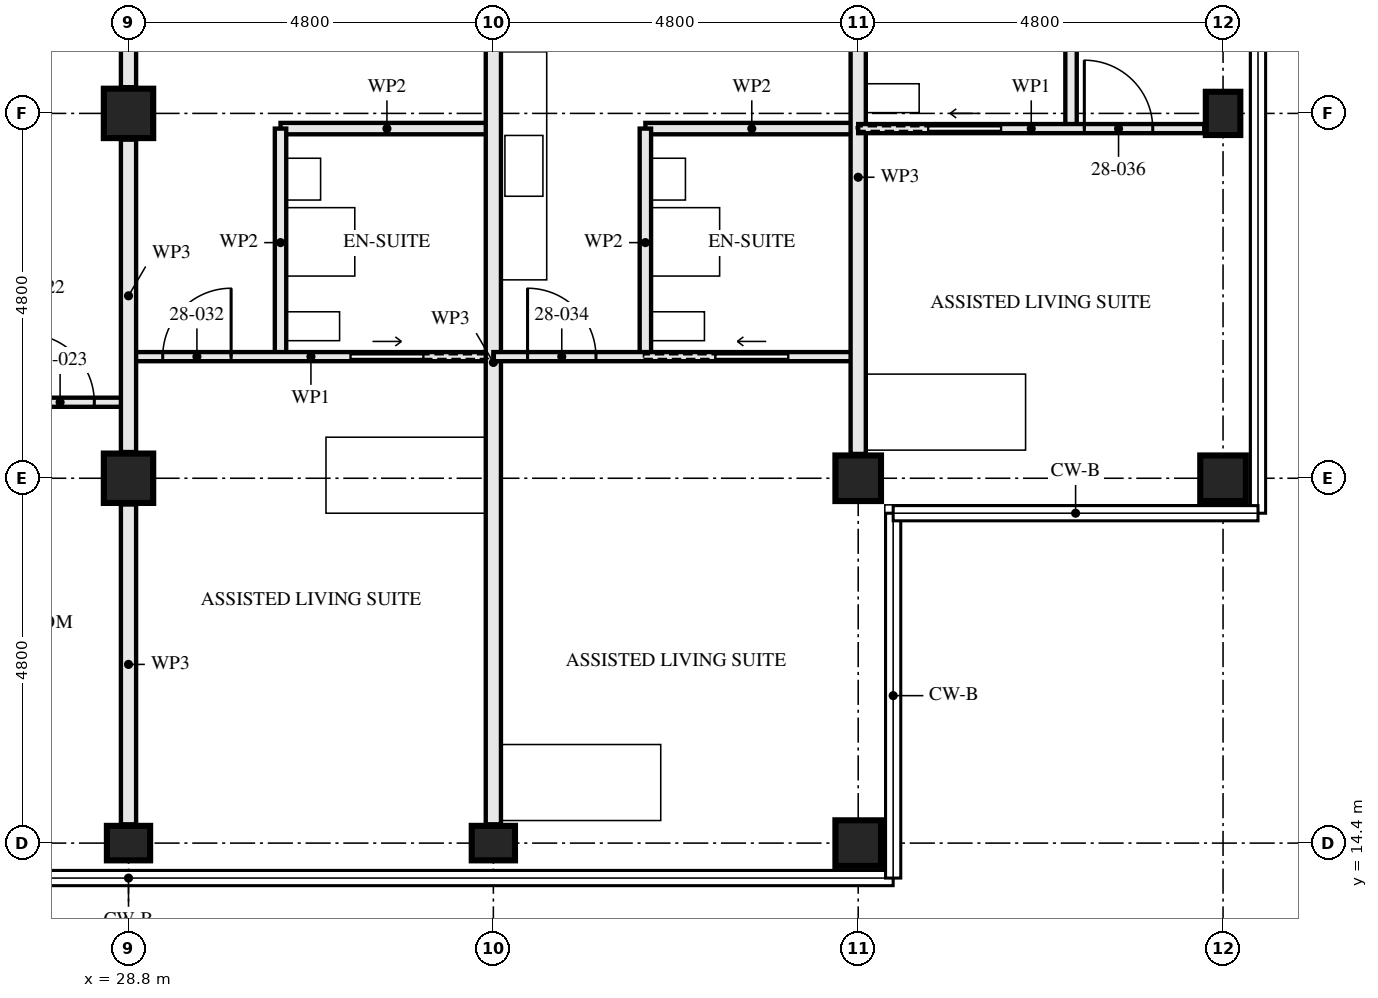
"""IFC4 building model, lengths in metres.
Left out: names, types, materials, properties, quantities, classifications, styles, units other than length and angle.
Written with IfcOpenShell. Run it as: python <this file> out.ifc"""

import sys

from ifc_helpers import new_model, si_unit, direction, frame, frame_2d, origin, origin_2d, place, context, subcontext, project, spatial, rectangle, hollow_rectangle, i_section, extrude, element, fill, save


model = new_model("IFC4")
c1 = context("Model", 3, precision=1e-05, world=origin(), true_north=direction((0.0, 1.0)))
c2 = subcontext(c1, "Body", "Model", "MODEL_VIEW")
j1 = project(units=[si_unit("LENGTHUNIT", "METRE"), si_unit("PLANEANGLEUNIT", "RADIAN")], contexts=[c1])
p1 = place(None, origin())
s1 = spatial("IfcSite", under=j1, at=p1, CompositionType="ELEMENT")
p2 = place(p1, origin())
s2 = spatial("IfcBuilding", under=s1, at=p2, CompositionType="ELEMENT")
p3 = place(p2, frame((0.0, 0.0, 105.0)))
s3 = spatial("IfcBuildingStorey", under=s2, at=p3, CompositionType="ELEMENT", Elevation=105.0)
p4 = place(p3, frame((28.8, 14.4, 0.0), z_axis=(0.0, 0.0, 1.0), x_axis=(0.0, 1.0, 0.0)))
e1 = element("IfcColumn", 1, at=p4, inside=s3, PredefinedType="COLUMN", context=c2, shape_type="SweptSolid", body=[
    extrude(i_section(OverallWidth=0.454, OverallDepth=0.569, WebThickness=0.078, FlangeThickness=0.125, FilletRadius=0.015, at=origin_2d()), origin(), (0.0, 0.0, 1.0), 3.5),
])
for number, where, z_axis, x_axis in (
    (2, (28.8, 19.2, 0.0), (0.0, 0.0, 1.0), (1.0, 0.0, 0.0)),
    (3, (28.8, 24.0, 0.0), (0.0, 0.0, 1.0), (1.0, 0.0, 0.0)),
):
    element("IfcColumn", number, at=place(p3, frame(where, z_axis=z_axis, x_axis=x_axis)), inside=s3, PredefinedType="COLUMN", context=c2, shape_type="SweptSolid", body=[
        extrude(hollow_rectangle(XDim=0.65, YDim=0.65, WallThickness=0.05, at=origin_2d()), origin(), (0.0, 0.0, 1.0), 3.5),
    ])
p5 = place(p3, frame((33.6, 14.4, 0.0), z_axis=(0.0, 0.0, 1.0), x_axis=(0.0, 1.0, 0.0)))
e4 = element("IfcColumn", 4, at=p5, inside=s3, PredefinedType="COLUMN", context=c2, shape_type="SweptSolid", body=[
    extrude(i_section(OverallWidth=0.454, OverallDepth=0.569, WebThickness=0.078, FlangeThickness=0.125, FilletRadius=0.015, at=origin_2d()), origin(), (0.0, 0.0, 1.0), 3.5),
])
for number, where, z_axis, x_axis in (
    (5, (38.4, 14.4, 0.0), (0.0, 0.0, 1.0), (0.0, 1.0, 0.0)),
    (6, (38.4, 19.2, 0.0), (0.0, 0.0, 1.0), (0.0, 1.0, 0.0)),
    (7, (43.2, 19.2, 0.0), (0.0, 0.0, 1.0), (0.0, 1.0, 0.0)),
):
    element("IfcColumn", number, at=place(p3, frame(where, z_axis=z_axis, x_axis=x_axis)), inside=s3, PredefinedType="COLUMN", context=c2, shape_type="SweptSolid", body=[
        extrude(hollow_rectangle(XDim=0.6, YDim=0.6, WallThickness=0.05, at=origin_2d()), origin(), (0.0, 0.0, 1.0), 3.5),
    ])
p6 = place(p3, frame((43.2, 24.0, 0.0), z_axis=(0.0, 0.0, 1.0), x_axis=(1.0, 0.0, 0.0)))
e8 = element("IfcColumn", 8, at=p6, inside=s3, PredefinedType="COLUMN", context=c2, shape_type="SweptSolid", body=[
    extrude(i_section(OverallWidth=0.454, OverallDepth=0.569, WebThickness=0.078, FlangeThickness=0.125, FilletRadius=0.015, at=origin_2d()), origin(), (0.0, 0.0, 1.0), 3.5),
])
p7 = place(p3, frame((24.0, 20.2, 0.0), z_axis=(0.0, 0.0, 1.0), x_axis=(1.0, 0.0, 0.0)))
e9 = element("IfcWall", 9, at=p7, inside=s3, PredefinedType="PARTITIONING", context=c2, shape_type="SweptSolid", body=[
    extrude(rectangle(XDim=4.8, YDim=0.12, at=frame_2d((2.4, 0.0))), origin(), (0.0, 0.0, 1.0), 3.33),
])
p8 = place(p7, frame((3.45, 0.0, 0.0)))
e10 = element("IfcOpeningElement", 10, at=p8, cuts=e9, PredefinedType="OPENING", context=c2, shape_type="SweptSolid", body=[
    extrude(rectangle(XDim=0.9, YDim=2.1, at=frame_2d((0.45, 1.05))), frame((0.0, 0.071, 0.0), z_axis=(0.0, -1.0, 0.0), x_axis=(1.0, 0.0, 0.0)), (0.0, 0.0, 1.0), 0.141),
])
p9 = place(p3, frame((30.8, 20.8, 0.0), z_axis=(0.0, 0.0, 1.0), x_axis=(0.0, 1.0, 0.0)))
e11 = element("IfcWall", 11, at=p9, inside=s3, PredefinedType="PARTITIONING", context=c2, shape_type="SweptSolid", body=[
    extrude(rectangle(XDim=3.0, YDim=0.15, at=frame_2d((1.5, 0.0))), origin(), (0.0, 0.0, 1.0), 3.33),
])
p10 = place(p3, frame((30.8, 23.8, 0.0), z_axis=(0.0, 0.0, 1.0), x_axis=(1.0, 0.0, 0.0)))
e12 = element("IfcWall", 12, at=p10, inside=s3, PredefinedType="PARTITIONING", context=c2, shape_type="SweptSolid", body=[
    extrude(rectangle(XDim=2.8, YDim=0.15, at=frame_2d((1.4, 0.0))), origin(), (0.0, 0.0, 1.0), 3.33),
])
p11 = place(p3, frame((28.8, 20.8, 0.0), z_axis=(0.0, 0.0, 1.0), x_axis=(1.0, 0.0, 0.0)))
e13 = element("IfcWall", 13, at=p11, inside=s3, PredefinedType="PARTITIONING", context=c2, shape_type="SweptSolid", body=[
    extrude(rectangle(XDim=4.8, YDim=0.12, at=frame_2d((2.4, 0.0))), origin(), (0.0, 0.0, 1.0), 3.33),
])
p12 = place(p11, frame((0.45, 0.0, 0.0)))
e14 = element("IfcOpeningElement", 14, at=p12, cuts=e13, PredefinedType="OPENING", context=c2, shape_type="SweptSolid", body=[
    extrude(rectangle(XDim=0.9, YDim=2.1, at=frame_2d((0.45, 1.05))), frame((0.0, 0.071, 0.0), z_axis=(0.0, -1.0, 0.0), x_axis=(1.0, 0.0, 0.0)), (0.0, 0.0, 1.0), 0.141),
])
p13 = place(p11, frame((2.925, 0.0, 0.0)))
e15 = element("IfcOpeningElement", 15, at=p13, cuts=e13, PredefinedType="OPENING", context=c2, shape_type="SweptSolid", body=[
    extrude(rectangle(XDim=0.95, YDim=2.1, at=frame_2d((0.475, 1.05))), frame((0.0, 0.071, 0.0), z_axis=(0.0, -1.0, 0.0), x_axis=(1.0, 0.0, 0.0)), (0.0, 0.0, 1.0), 0.141),
])
p14 = place(p3, frame((33.6, 14.647, 0.0), z_axis=(0.0, 0.0, 1.0), x_axis=(0.0, 1.0, 0.0)))
e16 = element("IfcWall", 16, at=p14, inside=s3, PredefinedType="PARTITIONING", context=c2, shape_type="SweptSolid", body=[
    extrude(rectangle(XDim=12.153, YDim=0.2, at=frame_2d((6.077, 0.0))), origin(), (0.0, 0.0, 1.0), 2.55),
])
p15 = place(p3, frame((35.6, 20.8, 0.0), z_axis=(0.0, 0.0, 1.0), x_axis=(0.0, 1.0, 0.0)))
e17 = element("IfcWall", 17, at=p15, inside=s3, PredefinedType="PARTITIONING", context=c2, shape_type="SweptSolid", body=[
    extrude(rectangle(XDim=3.0, YDim=0.15, at=frame_2d((1.5, 0.0))), origin(), (0.0, 0.0, 1.0), 3.33),
])
p16 = place(p3, frame((35.6, 23.8, 0.0), z_axis=(0.0, 0.0, 1.0), x_axis=(1.0, 0.0, 0.0)))
e18 = element("IfcWall", 18, at=p16, inside=s3, PredefinedType="PARTITIONING", context=c2, shape_type="SweptSolid", body=[
    extrude(rectangle(XDim=2.8, YDim=0.15, at=frame_2d((1.4, 0.0))), origin(), (0.0, 0.0, 1.0), 3.33),
])
p17 = place(p3, frame((33.6, 20.8, 0.0), z_axis=(0.0, 0.0, 1.0), x_axis=(1.0, 0.0, 0.0)))
e19 = element("IfcWall", 19, at=p17, inside=s3, PredefinedType="PARTITIONING", context=c2, shape_type="SweptSolid", body=[
    extrude(rectangle(XDim=4.8, YDim=0.12, at=frame_2d((2.4, 0.0))), origin(), (0.0, 0.0, 1.0), 3.33),
])
p18 = place(p17, frame((0.45, 0.0, 0.0)))
e20 = element("IfcOpeningElement", 20, at=p18, cuts=e19, PredefinedType="OPENING", context=c2, shape_type="SweptSolid", body=[
    extrude(rectangle(XDim=0.9, YDim=2.1, at=frame_2d((0.45, 1.05))), frame((0.0, 0.071, 0.0), z_axis=(0.0, -1.0, 0.0), x_axis=(1.0, 0.0, 0.0)), (0.0, 0.0, 1.0), 0.141),
])
p19 = place(p17, frame((2.925, 0.0, 0.0)))
e21 = element("IfcOpeningElement", 21, at=p19, cuts=e19, PredefinedType="OPENING", context=c2, shape_type="SweptSolid", body=[
    extrude(rectangle(XDim=0.95, YDim=2.1, at=frame_2d((0.475, 1.05))), frame((0.0, 0.071, 0.0), z_axis=(0.0, -1.0, 0.0), x_axis=(1.0, 0.0, 0.0)), (0.0, 0.0, 1.0), 0.141),
])
p20 = place(p3, frame((38.4, 19.52, 0.0), z_axis=(0.0, 0.0, 1.0), x_axis=(0.0, 1.0, 0.0)))
e22 = element("IfcWall", 22, at=p20, inside=s3, PredefinedType="PARTITIONING", context=c2, shape_type="SweptSolid", body=[
    extrude(rectangle(XDim=7.28, YDim=0.2, at=frame_2d((3.64, 0.0))), origin(), (0.0, 0.0, 1.0), 2.55),
])
p21 = place(p3, frame((41.2, 23.8, 0.0), z_axis=(0.0, 0.0, 1.0), x_axis=(0.0, 1.0, 0.0)))
e23 = element("IfcWall", 23, at=p21, inside=s3, PredefinedType="PARTITIONING", context=c2, shape_type="SweptSolid", body=[
    extrude(rectangle(XDim=3.0, YDim=0.15, at=frame_2d((1.5, 0.0))), origin(), (0.0, 0.0, 1.0), 2.55),
])
p22 = place(p3, frame((38.4, 23.8, 0.0), z_axis=(0.0, 0.0, 1.0), x_axis=(1.0, 0.0, 0.0)))
e24 = element("IfcWall", 24, at=p22, inside=s3, PredefinedType="PARTITIONING", context=c2, shape_type="SweptSolid", body=[
    extrude(rectangle(XDim=4.553, YDim=0.12, at=frame_2d((2.276, 0.0))), origin(), (0.0, 0.0, 1.0), 3.33),
])
p23 = place(p22, frame((2.975, 0.0, 0.0)))
e25 = element("IfcOpeningElement", 25, at=p23, cuts=e24, PredefinedType="OPENING", context=c2, shape_type="SweptSolid", body=[
    extrude(rectangle(XDim=0.9, YDim=2.1, at=frame_2d((0.45, 1.05))), frame((0.0, 0.071, 0.0), z_axis=(0.0, -1.0, 0.0), x_axis=(1.0, 0.0, 0.0)), (0.0, 0.0, 1.0), 0.141),
])
p24 = place(p22, frame((0.925, 0.0, 0.0)))
e26 = element("IfcOpeningElement", 26, at=p24, cuts=e24, PredefinedType="OPENING", context=c2, shape_type="SweptSolid", body=[
    extrude(rectangle(XDim=0.95, YDim=2.1, at=frame_2d((0.475, 1.05))), frame((0.0, 0.071, 0.0), z_axis=(0.0, -1.0, 0.0), x_axis=(1.0, 0.0, 0.0)), (0.0, 0.0, 1.0), 0.141),
])
p25 = place(p3, frame((28.8, 14.647, 0.0), z_axis=(0.0, 0.0, 1.0), x_axis=(0.0, 1.0, 0.0)))
e27 = element("IfcWall", 27, at=p25, inside=s3, PredefinedType="PARTITIONING", context=c2, shape_type="SweptSolid", body=[
    extrude(rectangle(XDim=4.208, YDim=0.2, at=frame_2d((2.104, 0.0))), origin(), (0.0, 0.0, 1.0), 2.32),
])
p26 = place(p3, frame((28.8, 19.545, 0.0), z_axis=(0.0, 0.0, 1.0), x_axis=(0.0, 1.0, 0.0)))
e28 = element("IfcWall", 28, at=p26, inside=s3, PredefinedType="PARTITIONING", context=c2, shape_type="SweptSolid", body=[
    extrude(rectangle(XDim=4.11, YDim=0.2, at=frame_2d((2.055, 0.0))), origin(), (0.0, 0.0, 1.0), 2.32),
])
p27 = place(p3, frame((28.8, 24.345, 0.0), z_axis=(0.0, 0.0, 1.0), x_axis=(0.0, 1.0, 0.0)))
e29 = element("IfcWall", 29, at=p27, inside=s3, PredefinedType="PARTITIONING", context=c2, shape_type="SweptSolid", body=[
    extrude(rectangle(XDim=2.555, YDim=0.2, at=frame_2d((1.277, 0.0))), origin(), (0.0, 0.0, 1.0), 2.32),
])
p28 = place(p8, origin())
e30 = element("IfcDoor", 30, at=p28, inside=s3, OperationType="SINGLE_SWING_RIGHT", PredefinedType="DOOR", context=c2, shape_type="SweptSolid", body=[
    extrude(rectangle(XDim=0.9, YDim=2.1, at=frame_2d((0.45, 1.05))), frame((0.0, 0.022, 0.0), z_axis=(0.0, -1.0, 0.0), x_axis=(1.0, 0.0, 0.0)), (0.0, 0.0, 1.0), 0.044),
])
fill(e10, e30)
p29 = place(p12, origin())
e31 = element("IfcDoor", 31, at=p29, inside=s3, OperationType="SINGLE_SWING_LEFT", PredefinedType="DOOR", context=c2, shape_type="SweptSolid", body=[
    extrude(rectangle(XDim=0.9, YDim=2.1, at=frame_2d((0.45, 1.05))), frame((0.0, 0.022, 0.0), z_axis=(0.0, -1.0, 0.0), x_axis=(1.0, 0.0, 0.0)), (0.0, 0.0, 1.0), 0.044),
])
fill(e14, e31)
p30 = place(p13, origin())
e32 = element("IfcDoor", 32, at=p30, inside=s3, OperationType="SLIDING_TO_LEFT", PredefinedType="DOOR", context=c2, shape_type="SweptSolid", body=[
    extrude(rectangle(XDim=0.95, YDim=2.1, at=frame_2d((0.475, 1.05))), frame((0.0, 0.022, 0.0), z_axis=(0.0, -1.0, 0.0), x_axis=(1.0, 0.0, 0.0)), (0.0, 0.0, 1.0), 0.044),
])
fill(e15, e32)
p31 = place(p18, origin())
e33 = element("IfcDoor", 33, at=p31, inside=s3, OperationType="SINGLE_SWING_RIGHT", PredefinedType="DOOR", context=c2, shape_type="SweptSolid", body=[
    extrude(rectangle(XDim=0.9, YDim=2.1, at=frame_2d((0.45, 1.05))), frame((0.0, 0.022, 0.0), z_axis=(0.0, -1.0, 0.0), x_axis=(1.0, 0.0, 0.0)), (0.0, 0.0, 1.0), 0.044),
])
fill(e20, e33)
p32 = place(p19, origin())
e34 = element("IfcDoor", 34, at=p32, inside=s3, OperationType="SLIDING_TO_RIGHT", PredefinedType="DOOR", context=c2, shape_type="SweptSolid", body=[
    extrude(rectangle(XDim=0.95, YDim=2.1, at=frame_2d((0.475, 1.05))), frame((0.0, 0.022, 0.0), z_axis=(0.0, -1.0, 0.0), x_axis=(1.0, 0.0, 0.0)), (0.0, 0.0, 1.0), 0.044),
])
fill(e21, e34)
p33 = place(p23, origin())
e35 = element("IfcDoor", 35, at=p33, inside=s3, OperationType="SINGLE_SWING_RIGHT", PredefinedType="DOOR", context=c2, shape_type="SweptSolid", body=[
    extrude(rectangle(XDim=0.9, YDim=2.1, at=frame_2d((0.45, 1.05))), frame((0.0, 0.022, 0.0), z_axis=(0.0, -1.0, 0.0), x_axis=(1.0, 0.0, 0.0)), (0.0, 0.0, 1.0), 0.044),
])
fill(e25, e35)
p34 = place(p24, origin())
e36 = element("IfcDoor", 36, at=p34, inside=s3, OperationType="SLIDING_TO_RIGHT", PredefinedType="DOOR", context=c2, shape_type="SweptSolid", body=[
    extrude(rectangle(XDim=0.95, YDim=2.1, at=frame_2d((0.475, 1.05))), frame((0.0, 0.022, 0.0), z_axis=(0.0, -1.0, 0.0), x_axis=(1.0, 0.0, 0.0)), (0.0, 0.0, 1.0), 0.044),
])
fill(e26, e36)
save(model, sys.argv[1])
